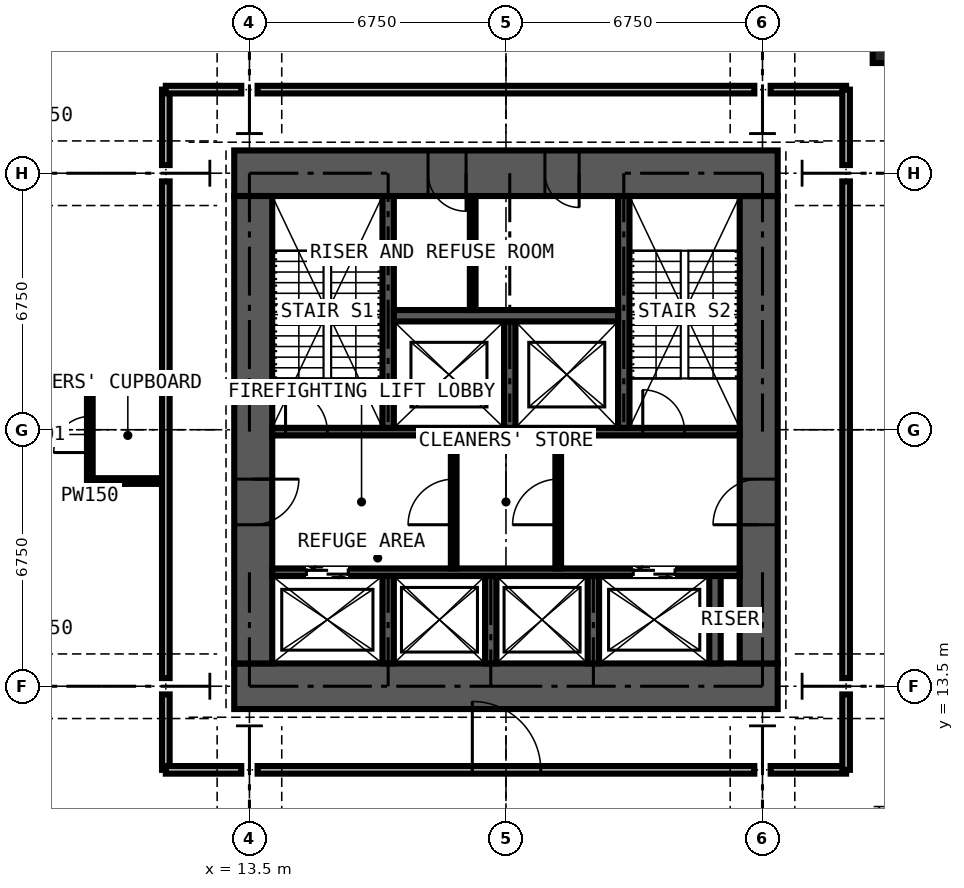
"""IFC4 building model, lengths in metres.
Left out: names, types, materials, properties, quantities, classifications, styles, units other than length and angle.
Written with IfcOpenShell. Run it as: python <this file> out.ifc"""

import sys

from ifc_helpers import new_model, si_unit, direction, frame, frame_2d, origin, origin_2d, place, context, subcontext, project, spatial, rectangle, extrude, element, fill, save


model = new_model("IFC4")
c1 = context("Model", 3, precision=1e-05, world=origin(), true_north=direction((0.0, 1.0)))
c2 = subcontext(c1, "Body", "Model", "MODEL_VIEW")
j1 = project(units=[si_unit("LENGTHUNIT", "METRE"), si_unit("PLANEANGLEUNIT", "RADIAN")], contexts=[c1])
p1 = place(None, origin())
s1 = spatial("IfcSite", under=j1, at=p1, CompositionType="ELEMENT")
p2 = place(p1, origin())
s2 = spatial("IfcBuilding", under=s1, at=p2, CompositionType="ELEMENT")
p3 = place(p2, frame((0.0, 0.0, 199.8)))
s3 = spatial("IfcBuildingStorey", under=s2, at=p3, CompositionType="ELEMENT", Elevation=199.8)
p4 = place(p3, frame((30.375, 30.375, 0.0), z_axis=(0.0, 0.0, 1.0), x_axis=(1.0, 0.0, 0.0)))
e1 = element("IfcColumn", 1, at=p4, inside=s3, PredefinedType="COLUMN", context=c2, shape_type="SweptSolid", body=[
    extrude(rectangle(XDim=0.95, YDim=0.95, at=origin_2d()), origin(), (0.0, 0.0, 1.0), 4.5),
])
p5 = place(p3, frame((13.1, 13.5, 0.0), z_axis=(0.0, 0.0, 1.0), x_axis=(1.0, 0.0, 0.0)))
e2 = element("IfcWall", 2, at=p5, inside=s3, PredefinedType="SHEAR", context=c2, shape_type="SweptSolid", body=[
    extrude(rectangle(XDim=14.3, YDim=1.2, at=frame_2d((7.15, 0.0))), origin(), (0.0, 0.0, 1.0), 4.5),
])
p6 = place(p3, frame((26.9, 14.1, 0.0), z_axis=(0.0, 0.0, 1.0), x_axis=(0.0, 1.0, 0.0)))
e3 = element("IfcWall", 3, at=p6, inside=s3, PredefinedType="SHEAR", context=c2, shape_type="SweptSolid", body=[
    extrude(rectangle(XDim=12.3, YDim=1.0, at=frame_2d((6.15, 0.0))), origin(), (0.0, 0.0, 1.0), 4.5),
])
p7 = place(p6, frame((3.65, 0.0, 0.0)))
e4 = element("IfcOpeningElement", 4, at=p7, cuts=e3, PredefinedType="OPENING", context=c2, shape_type="SweptSolid", body=[
    extrude(rectangle(XDim=1.2, YDim=2.2, at=frame_2d((0.6, 1.1))), frame((0.0, 0.51, 0.0), z_axis=(0.0, -1.0, 0.0), x_axis=(1.0, 0.0, 0.0)), (0.0, 0.0, 1.0), 1.02),
])
p8 = place(p3, frame((27.4, 27.0, 0.0), z_axis=(0.0, 0.0, 1.0), x_axis=(-1.0, 0.0, 0.0)))
e5 = element("IfcWall", 5, at=p8, inside=s3, PredefinedType="SHEAR", context=c2, shape_type="SweptSolid", body=[
    extrude(rectangle(XDim=14.3, YDim=1.2, at=frame_2d((7.15, 0.0))), origin(), (0.0, 0.0, 1.0), 4.5),
])
p9 = place(p8, frame((5.225, 0.0, 0.0)))
e6 = element("IfcOpeningElement", 6, at=p9, cuts=e5, PredefinedType="OPENING", context=c2, shape_type="SweptSolid", body=[
    extrude(rectangle(XDim=0.9, YDim=2.2, at=frame_2d((0.45, 1.1))), frame((0.0, 0.61, 0.0), z_axis=(0.0, -1.0, 0.0), x_axis=(1.0, 0.0, 0.0)), (0.0, 0.0, 1.0), 1.22),
])
p10 = place(p8, frame((8.2, 0.0, 0.0)))
e7 = element("IfcOpeningElement", 7, at=p10, cuts=e5, PredefinedType="OPENING", context=c2, shape_type="SweptSolid", body=[
    extrude(rectangle(XDim=1.0, YDim=2.2, at=frame_2d((0.5, 1.1))), frame((0.0, 0.61, 0.0), z_axis=(0.0, -1.0, 0.0), x_axis=(1.0, 0.0, 0.0)), (0.0, 0.0, 1.0), 1.22),
])
p11 = place(p3, frame((13.6, 26.4, 0.0), z_axis=(0.0, 0.0, 1.0), x_axis=(0.0, -1.0, 0.0)))
e8 = element("IfcWall", 8, at=p11, inside=s3, PredefinedType="SHEAR", context=c2, shape_type="SweptSolid", body=[
    extrude(rectangle(XDim=12.3, YDim=1.0, at=frame_2d((6.15, 0.0))), origin(), (0.0, 0.0, 1.0), 4.5),
])
p12 = place(p11, frame((7.45, 0.0, 0.0)))
e9 = element("IfcOpeningElement", 9, at=p12, cuts=e8, PredefinedType="OPENING", context=c2, shape_type="SweptSolid", body=[
    extrude(rectangle(XDim=1.2, YDim=2.2, at=frame_2d((0.6, 1.1))), frame((0.0, 0.51, 0.0), z_axis=(0.0, -1.0, 0.0), x_axis=(1.0, 0.0, 0.0)), (0.0, 0.0, 1.0), 1.02),
])
p13 = place(p3, frame((14.1, 16.5, 0.0), z_axis=(0.0, 0.0, 1.0), x_axis=(1.0, 0.0, 0.0)))
e10 = element("IfcWall", 10, at=p13, inside=s3, PredefinedType="SHEAR", context=c2, shape_type="SweptSolid", body=[
    extrude(rectangle(XDim=12.3, YDim=0.2, at=frame_2d((6.15, 0.0))), origin(), (0.0, 0.0, 1.0), 4.5),
])
p14 = place(p13, frame((0.9, 0.0, 0.0)))
e11 = element("IfcOpeningElement", 11, at=p14, cuts=e10, PredefinedType="OPENING", context=c2, shape_type="SweptSolid", body=[
    extrude(rectangle(XDim=1.1, YDim=2.2, at=frame_2d((0.55, 1.1))), frame((0.0, 0.11, 0.0), z_axis=(0.0, -1.0, 0.0), x_axis=(1.0, 0.0, 0.0)), (0.0, 0.0, 1.0), 0.22),
])
p15 = place(p13, frame((9.5, 0.0, 0.0)))
e12 = element("IfcOpeningElement", 12, at=p15, cuts=e10, PredefinedType="OPENING", context=c2, shape_type="SweptSolid", body=[
    extrude(rectangle(XDim=1.1, YDim=2.2, at=frame_2d((0.55, 1.1))), frame((0.0, 0.11, 0.0), z_axis=(0.0, -1.0, 0.0), x_axis=(1.0, 0.0, 0.0)), (0.0, 0.0, 1.0), 0.22),
])
p16 = place(p3, frame((14.1, 20.2, 0.0), z_axis=(0.0, 0.0, 1.0), x_axis=(1.0, 0.0, 0.0)))
e13 = element("IfcWall", 13, at=p16, inside=s3, PredefinedType="SHEAR", context=c2, shape_type="SweptSolid", body=[
    extrude(rectangle(XDim=12.3, YDim=0.2, at=frame_2d((6.15, 0.0))), origin(), (0.0, 0.0, 1.0), 4.5),
])
p17 = place(p16, frame((0.35, 0.0, 0.0)))
e14 = element("IfcOpeningElement", 14, at=p17, cuts=e13, PredefinedType="OPENING", context=c2, shape_type="SweptSolid", body=[
    extrude(rectangle(XDim=1.1, YDim=2.2, at=frame_2d((0.55, 1.1))), frame((0.0, 0.11, 0.0), z_axis=(0.0, -1.0, 0.0), x_axis=(1.0, 0.0, 0.0)), (0.0, 0.0, 1.0), 0.22),
])
p18 = place(p16, frame((9.75, 0.0, 0.0)))
e15 = element("IfcOpeningElement", 15, at=p18, cuts=e13, PredefinedType="OPENING", context=c2, shape_type="SweptSolid", body=[
    extrude(rectangle(XDim=1.1, YDim=2.2, at=frame_2d((0.55, 1.1))), frame((0.0, 0.11, 0.0), z_axis=(0.0, -1.0, 0.0), x_axis=(1.0, 0.0, 0.0)), (0.0, 0.0, 1.0), 0.22),
])
for number, where, z_axis, x_axis in (
    (16, (17.15, 20.3, 0.0), (0.0, 0.0, 1.0), (0.0, 1.0, 0.0)),
    (17, (23.35, 20.3, 0.0), (0.0, 0.0, 1.0), (0.0, 1.0, 0.0)),
):
    element("IfcWall", number, at=place(p3, frame(where, z_axis=z_axis, x_axis=x_axis)), inside=s3, PredefinedType="SHEAR", context=c2, shape_type="SweptSolid", body=[
        extrude(rectangle(XDim=6.1, YDim=0.3, at=frame_2d((3.05, 0.0))), origin(), (0.0, 0.0, 1.0), 4.5),
    ])
p19 = place(p3, frame((20.35, 20.3, 0.0), z_axis=(0.0, 0.0, 1.0), x_axis=(0.0, 1.0, 0.0)))
e18 = element("IfcWall", 18, at=p19, inside=s3, PredefinedType="SHEAR", context=c2, shape_type="SweptSolid", body=[
    extrude(rectangle(XDim=2.8, YDim=0.3, at=frame_2d((1.4, 0.0))), origin(), (0.0, 0.0, 1.0), 4.5),
])
p20 = place(p3, frame((17.3, 23.25, 0.0), z_axis=(0.0, 0.0, 1.0), x_axis=(1.0, 0.0, 0.0)))
e19 = element("IfcWall", 19, at=p20, inside=s3, PredefinedType="SHEAR", context=c2, shape_type="SweptSolid", body=[
    extrude(rectangle(XDim=5.9, YDim=0.3, at=frame_2d((2.95, 0.0))), origin(), (0.0, 0.0, 1.0), 4.5),
])
for number, where, z_axis, x_axis in (
    (20, (17.15, 14.1, 0.0), (0.0, 0.0, 1.0), (0.0, 1.0, 0.0)),
    (21, (19.85, 14.1, 0.0), (0.0, 0.0, 1.0), (0.0, 1.0, 0.0)),
    (22, (22.55, 14.1, 0.0), (0.0, 0.0, 1.0), (0.0, 1.0, 0.0)),
    (23, (25.75, 14.1, 0.0), (0.0, 0.0, 1.0), (0.0, 1.0, 0.0)),
):
    element("IfcWall", number, at=place(p3, frame(where, z_axis=z_axis, x_axis=x_axis)), inside=s3, PredefinedType="SHEAR", context=c2, shape_type="SweptSolid", body=[
        extrude(rectangle(XDim=2.3, YDim=0.3, at=frame_2d((1.15, 0.0))), origin(), (0.0, 0.0, 1.0), 4.5),
    ])
p21 = place(p3, frame((18.875, 16.6, 0.0), z_axis=(0.0, 0.0, 1.0), x_axis=(0.0, 1.0, 0.0)))
e24 = element("IfcWall", 24, at=p21, inside=s3, PredefinedType="PARTITIONING", context=c2, shape_type="SweptSolid", body=[
    extrude(rectangle(XDim=3.5, YDim=0.15, at=frame_2d((1.75, 0.0))), origin(), (0.0, 0.0, 1.0), 4.15),
])
p22 = place(p21, frame((1.15, 0.0, 0.0)))
e25 = element("IfcOpeningElement", 25, at=p22, cuts=e24, PredefinedType="OPENING", context=c2, shape_type="SweptSolid", body=[
    extrude(rectangle(XDim=1.2, YDim=2.2, at=frame_2d((0.6, 1.1))), frame((0.0, 0.085, 0.0), z_axis=(0.0, -1.0, 0.0), x_axis=(1.0, 0.0, 0.0)), (0.0, 0.0, 1.0), 0.17),
])
p23 = place(p3, frame((21.625, 16.6, 0.0), z_axis=(0.0, 0.0, 1.0), x_axis=(0.0, 1.0, 0.0)))
e26 = element("IfcWall", 26, at=p23, inside=s3, PredefinedType="PARTITIONING", context=c2, shape_type="SweptSolid", body=[
    extrude(rectangle(XDim=3.5, YDim=0.15, at=frame_2d((1.75, 0.0))), origin(), (0.0, 0.0, 1.0), 4.15),
])
p24 = place(p23, frame((1.15, 0.0, 0.0)))
e27 = element("IfcOpeningElement", 27, at=p24, cuts=e26, PredefinedType="OPENING", context=c2, shape_type="SweptSolid", body=[
    extrude(rectangle(XDim=1.2, YDim=2.2, at=frame_2d((0.6, 1.1))), frame((0.0, 0.085, 0.0), z_axis=(0.0, -1.0, 0.0), x_axis=(1.0, 0.0, 0.0)), (0.0, 0.0, 1.0), 0.17),
])
p25 = place(p3, frame((19.375, 23.4, 0.0), z_axis=(0.0, 0.0, 1.0), x_axis=(0.0, 1.0, 0.0)))
e28 = element("IfcWall", 28, at=p25, inside=s3, PredefinedType="PARTITIONING", context=c2, shape_type="SweptSolid", body=[
    extrude(rectangle(XDim=3.0, YDim=0.15, at=frame_2d((1.5, 0.0))), origin(), (0.0, 0.0, 1.0), 4.15),
])
p26 = place(p3, frame((9.3, 18.9, 0.0), z_axis=(0.0, 0.0, 1.0), x_axis=(0.0, 1.0, 0.0)))
e29 = element("IfcWall", 29, at=p26, inside=s3, PredefinedType="PARTITIONING", context=c2, shape_type="SweptSolid", body=[
    extrude(rectangle(XDim=2.4, YDim=0.15, at=frame_2d((1.2, 0.0))), origin(), (0.0, 0.0, 1.0), 4.15),
])
p27 = place(p26, frame((0.75, 0.0, 0.0)))
e30 = element("IfcOpeningElement", 30, at=p27, cuts=e29, PredefinedType="OPENING", context=c2, shape_type="SweptSolid", body=[
    extrude(rectangle(XDim=0.95, YDim=2.2, at=frame_2d((0.475, 1.1))), frame((0.0, 0.085, 0.0), z_axis=(0.0, -1.0, 0.0), x_axis=(1.0, 0.0, 0.0)), (0.0, 0.0, 1.0), 0.17),
])
for number, where, z_axis, x_axis in (
    (31, (9.3, 18.9, 0.0), (0.0, 0.0, 1.0), (1.0, 0.0, 0.0)),
    (32, (9.3, 21.3, 0.0), (0.0, 0.0, 1.0), (1.0, 0.0, 0.0)),
):
    element("IfcWall", number, at=place(p3, frame(where, z_axis=z_axis, x_axis=x_axis)), inside=s3, PredefinedType="PARTITIONING", context=c2, shape_type="SweptSolid", body=[
        extrude(rectangle(XDim=2.0, YDim=0.15, at=frame_2d((1.0, 0.0))), origin(), (0.0, 0.0, 1.0), 4.15),
    ])
for number, where, z_axis, x_axis in (
    (33, (11.3, 11.3, 0.0), (0.0, 0.0, 1.0), (0.0, 1.0, 0.0)),
    (34, (11.3, 11.3, 0.0), (0.0, 0.0, 1.0), (1.0, 0.0, 0.0)),
):
    element("IfcWall", number, at=place(p3, frame(where, z_axis=z_axis, x_axis=x_axis)), inside=s3, PredefinedType="PARTITIONING", context=c2, shape_type="SweptSolid", body=[
        extrude(rectangle(XDim=1.985, YDim=0.2, at=frame_2d((0.992, 0.0))), origin(), (0.0, 0.0, 1.0), 4.15),
    ])
p28 = place(p3, frame((11.3, 13.715, 0.0), z_axis=(0.0, 0.0, 1.0), x_axis=(0.0, 1.0, 0.0)))
e35 = element("IfcWall", 35, at=p28, inside=s3, PredefinedType="PARTITIONING", context=c2, shape_type="SweptSolid", body=[
    extrude(rectangle(XDim=13.07, YDim=0.2, at=frame_2d((6.535, 0.0))), origin(), (0.0, 0.0, 1.0), 4.15),
])
for number, where, z_axis, x_axis in (
    (36, (11.3, 27.215, 0.0), (0.0, 0.0, 1.0), (0.0, 1.0, 0.0)),
    (37, (11.3, 29.2, 0.0), (0.0, 0.0, 1.0), (1.0, 0.0, 0.0)),
):
    element("IfcWall", number, at=place(p3, frame(where, z_axis=z_axis, x_axis=x_axis)), inside=s3, PredefinedType="PARTITIONING", context=c2, shape_type="SweptSolid", body=[
        extrude(rectangle(XDim=1.985, YDim=0.2, at=frame_2d((0.992, 0.0))), origin(), (0.0, 0.0, 1.0), 4.15),
    ])
p29 = place(p3, frame((13.715, 11.3, 0.0), z_axis=(0.0, 0.0, 1.0), x_axis=(1.0, 0.0, 0.0)))
e38 = element("IfcWall", 38, at=p29, inside=s3, PredefinedType="PARTITIONING", context=c2, shape_type="SweptSolid", body=[
    extrude(rectangle(XDim=13.07, YDim=0.2, at=frame_2d((6.535, 0.0))), origin(), (0.0, 0.0, 1.0), 4.15),
])
p30 = place(p29, frame((5.65, 0.0, 0.0)))
e39 = element("IfcOpeningElement", 39, at=p30, cuts=e38, PredefinedType="OPENING", context=c2, shape_type="SweptSolid", body=[
    extrude(rectangle(XDim=1.8, YDim=2.4, at=frame_2d((0.9, 1.2))), frame((0.0, 0.11, 0.0), z_axis=(0.0, -1.0, 0.0), x_axis=(1.0, 0.0, 0.0)), (0.0, 0.0, 1.0), 0.22),
])
p31 = place(p3, frame((13.715, 29.2, 0.0), z_axis=(0.0, 0.0, 1.0), x_axis=(1.0, 0.0, 0.0)))
e40 = element("IfcWall", 40, at=p31, inside=s3, PredefinedType="PARTITIONING", context=c2, shape_type="SweptSolid", body=[
    extrude(rectangle(XDim=13.07, YDim=0.2, at=frame_2d((6.535, 0.0))), origin(), (0.0, 0.0, 1.0), 4.15),
])
for number, where, z_axis, x_axis in (
    (41, (27.215, 11.3, 0.0), (0.0, 0.0, 1.0), (1.0, 0.0, 0.0)),
    (42, (27.215, 29.2, 0.0), (0.0, 0.0, 1.0), (1.0, 0.0, 0.0)),
    (43, (29.2, 11.3, 0.0), (0.0, 0.0, 1.0), (0.0, 1.0, 0.0)),
):
    element("IfcWall", number, at=place(p3, frame(where, z_axis=z_axis, x_axis=x_axis)), inside=s3, PredefinedType="PARTITIONING", context=c2, shape_type="SweptSolid", body=[
        extrude(rectangle(XDim=1.985, YDim=0.2, at=frame_2d((0.992, 0.0))), origin(), (0.0, 0.0, 1.0), 4.15),
    ])
p32 = place(p3, frame((29.2, 13.715, 0.0), z_axis=(0.0, 0.0, 1.0), x_axis=(0.0, 1.0, 0.0)))
e44 = element("IfcWall", 44, at=p32, inside=s3, PredefinedType="PARTITIONING", context=c2, shape_type="SweptSolid", body=[
    extrude(rectangle(XDim=13.07, YDim=0.2, at=frame_2d((6.535, 0.0))), origin(), (0.0, 0.0, 1.0), 4.15),
])
p33 = place(p3, frame((29.2, 27.215, 0.0), z_axis=(0.0, 0.0, 1.0), x_axis=(0.0, 1.0, 0.0)))
e45 = element("IfcWall", 45, at=p33, inside=s3, PredefinedType="PARTITIONING", context=c2, shape_type="SweptSolid", body=[
    extrude(rectangle(XDim=1.985, YDim=0.2, at=frame_2d((0.992, 0.0))), origin(), (0.0, 0.0, 1.0), 4.15),
])
p34 = place(p14, origin())
e46 = element("IfcDoor", 46, at=p34, inside=s3, OperationType="DOUBLE_DOOR_SLIDING", PredefinedType="DOOR", context=c2, shape_type="SweptSolid", body=[
    extrude(rectangle(XDim=1.1, YDim=2.2, at=frame_2d((0.55, 1.1))), frame((0.0, 0.025, 0.0), z_axis=(0.0, -1.0, 0.0), x_axis=(1.0, 0.0, 0.0)), (0.0, 0.0, 1.0), 0.05),
])
fill(e11, e46)
p35 = place(p15, origin())
e47 = element("IfcDoor", 47, at=p35, inside=s3, OperationType="DOUBLE_DOOR_SLIDING", PredefinedType="DOOR", context=c2, shape_type="SweptSolid", body=[
    extrude(rectangle(XDim=1.1, YDim=2.2, at=frame_2d((0.55, 1.1))), frame((0.0, 0.025, 0.0), z_axis=(0.0, -1.0, 0.0), x_axis=(1.0, 0.0, 0.0)), (0.0, 0.0, 1.0), 0.05),
])
fill(e12, e47)
p36 = place(p12, origin())
e48 = element("IfcDoor", 48, at=p36, inside=s3, OperationType="DOUBLE_DOOR_SINGLE_SWING", PredefinedType="DOOR", context=c2, shape_type="SweptSolid", body=[
    extrude(rectangle(XDim=1.2, YDim=2.2, at=frame_2d((0.6, 1.1))), frame((0.0, 0.025, 0.0), z_axis=(0.0, -1.0, 0.0), x_axis=(1.0, 0.0, 0.0)), (0.0, 0.0, 1.0), 0.05),
])
fill(e9, e48)
p37 = place(p7, origin())
e49 = element("IfcDoor", 49, at=p37, inside=s3, OperationType="DOUBLE_DOOR_SINGLE_SWING", PredefinedType="DOOR", context=c2, shape_type="SweptSolid", body=[
    extrude(rectangle(XDim=1.2, YDim=2.2, at=frame_2d((0.6, 1.1))), frame((0.0, 0.025, 0.0), z_axis=(0.0, -1.0, 0.0), x_axis=(1.0, 0.0, 0.0)), (0.0, 0.0, 1.0), 0.05),
])
fill(e4, e49)
p38 = place(p22, origin())
e50 = element("IfcDoor", 50, at=p38, inside=s3, OperationType="DOUBLE_DOOR_SINGLE_SWING", PredefinedType="DOOR", context=c2, shape_type="SweptSolid", body=[
    extrude(rectangle(XDim=1.2, YDim=2.2, at=frame_2d((0.6, 1.1))), frame((0.0, 0.025, 0.0), z_axis=(0.0, -1.0, 0.0), x_axis=(1.0, 0.0, 0.0)), (0.0, 0.0, 1.0), 0.05),
])
fill(e25, e50)
p39 = place(p24, origin())
e51 = element("IfcDoor", 51, at=p39, inside=s3, OperationType="DOUBLE_DOOR_SINGLE_SWING", PredefinedType="DOOR", context=c2, shape_type="SweptSolid", body=[
    extrude(rectangle(XDim=1.2, YDim=2.2, at=frame_2d((0.6, 1.1))), frame((0.0, 0.025, 0.0), z_axis=(0.0, -1.0, 0.0), x_axis=(1.0, 0.0, 0.0)), (0.0, 0.0, 1.0), 0.05),
])
fill(e27, e51)
p40 = place(p9, origin())
e52 = element("IfcDoor", 52, at=p40, inside=s3, OperationType="SINGLE_SWING_LEFT", PredefinedType="DOOR", context=c2, shape_type="SweptSolid", body=[
    extrude(rectangle(XDim=0.9, YDim=2.2, at=frame_2d((0.45, 1.1))), frame((0.0, 0.4, 0.0), z_axis=(0.0, -1.0, 0.0), x_axis=(1.0, 0.0, 0.0)), (0.0, 0.0, 1.0), 0.8),
])
fill(e6, e52)
p41 = place(p10, origin())
e53 = element("IfcDoor", 53, at=p41, inside=s3, OperationType="SINGLE_SWING_LEFT", PredefinedType="DOOR", context=c2, shape_type="SweptSolid", body=[
    extrude(rectangle(XDim=1.0, YDim=2.2, at=frame_2d((0.5, 1.1))), frame((0.0, 0.025, 0.0), z_axis=(0.0, -1.0, 0.0), x_axis=(1.0, 0.0, 0.0)), (0.0, 0.0, 1.0), 0.05),
])
fill(e7, e53)
p42 = place(p17, origin())
e54 = element("IfcDoor", 54, at=p42, inside=s3, OperationType="SINGLE_SWING_LEFT", PredefinedType="DOOR", context=c2, shape_type="SweptSolid", body=[
    extrude(rectangle(XDim=1.1, YDim=2.2, at=frame_2d((0.55, 1.1))), frame((0.0, 0.025, 0.0), z_axis=(0.0, -1.0, 0.0), x_axis=(1.0, 0.0, 0.0)), (0.0, 0.0, 1.0), 0.05),
])
fill(e14, e54)
p43 = place(p18, origin())
e55 = element("IfcDoor", 55, at=p43, inside=s3, OperationType="SINGLE_SWING_LEFT", PredefinedType="DOOR", context=c2, shape_type="SweptSolid", body=[
    extrude(rectangle(XDim=1.1, YDim=2.2, at=frame_2d((0.55, 1.1))), frame((0.0, 0.025, 0.0), z_axis=(0.0, -1.0, 0.0), x_axis=(1.0, 0.0, 0.0)), (0.0, 0.0, 1.0), 0.05),
])
fill(e15, e55)
p44 = place(p27, origin())
e56 = element("IfcDoor", 56, at=p44, inside=s3, OperationType="SINGLE_SWING_LEFT", PredefinedType="DOOR", context=c2, shape_type="SweptSolid", body=[
    extrude(rectangle(XDim=0.95, YDim=2.2, at=frame_2d((0.475, 1.1))), frame((0.0, 0.025, 0.0), z_axis=(0.0, -1.0, 0.0), x_axis=(1.0, 0.0, 0.0)), (0.0, 0.0, 1.0), 0.05),
])
fill(e30, e56)
p45 = place(p30, origin())
e57 = element("IfcDoor", 57, at=p45, inside=s3, OperationType="DOUBLE_DOOR_SINGLE_SWING", PredefinedType="DOOR", context=c2, shape_type="SweptSolid", body=[
    extrude(rectangle(XDim=1.8, YDim=2.4, at=frame_2d((0.9, 1.2))), frame((0.0, 0.025, 0.0), z_axis=(0.0, -1.0, 0.0), x_axis=(1.0, 0.0, 0.0)), (0.0, 0.0, 1.0), 0.05),
])
fill(e39, e57)
save(model, sys.argv[1])
